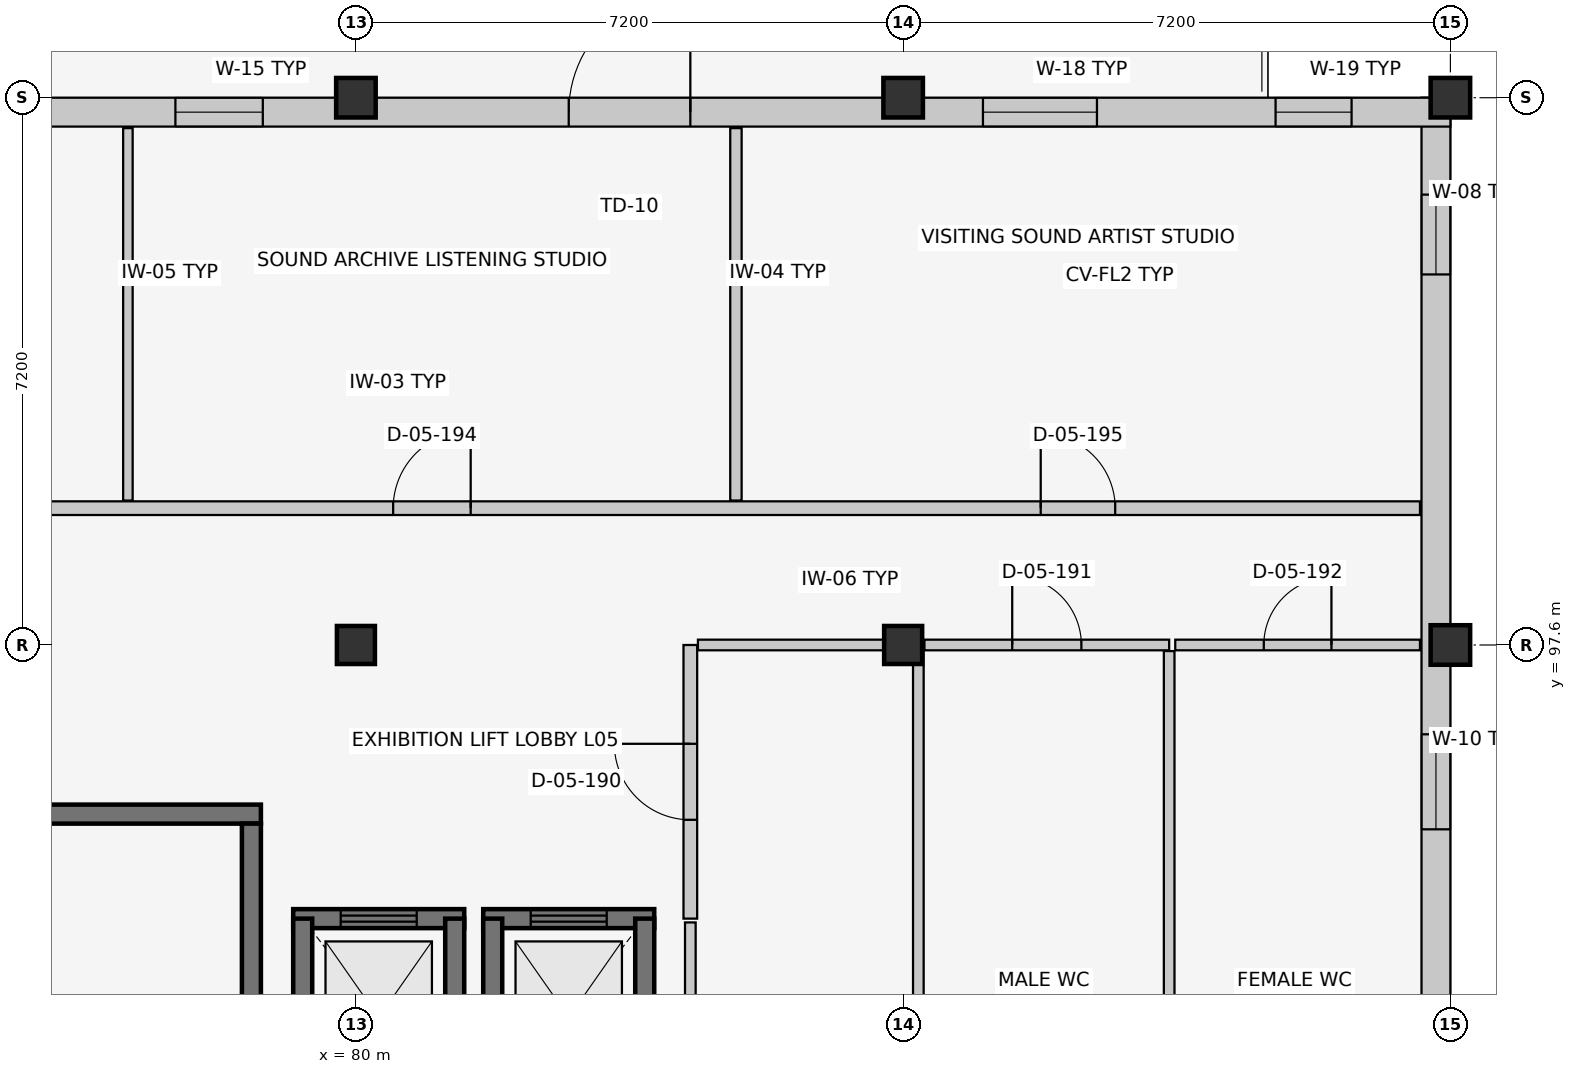
"""IFC4 building model, lengths in metres.
Left out: names, types, materials, properties, quantities, classifications, styles, units other than length and angle.
Written with IfcOpenShell. Run it as: python <this file> out.ifc"""

import sys

from ifc_helpers import new_model, si_unit, direction, frame, frame_2d, origin, origin_2d, place, context, subcontext, project, spatial, rectangle, extrude, element, fill, save


model = new_model("IFC4")
c1 = context("Model", 3, precision=1e-05, world=origin(), true_north=direction((0.0, 1.0)))
c2 = subcontext(c1, "Body", "Model", "MODEL_VIEW")
j1 = project(units=[si_unit("LENGTHUNIT", "METRE"), si_unit("PLANEANGLEUNIT", "RADIAN")], contexts=[c1])
p1 = place(None, origin())
s1 = spatial("IfcSite", under=j1, at=p1, CompositionType="ELEMENT")
p2 = place(p1, origin())
s2 = spatial("IfcBuilding", under=s1, at=p2, CompositionType="ELEMENT")
p3 = place(p2, frame((0.0, 0.0, 21.9)))
s3 = spatial("IfcBuildingStorey", under=s2, at=p3, CompositionType="ELEMENT", Elevation=21.9)
p4 = place(p3, frame((80.0, 97.6, 0.0), z_axis=(0.0, 0.0, 1.0), x_axis=(1.0, 0.0, 0.0)))
e1 = element("IfcColumn", 1, at=p4, inside=s3, PredefinedType="COLUMN", context=c2, shape_type="SweptSolid", body=[
    extrude(rectangle(XDim=0.5, YDim=0.5, at=origin_2d()), origin(), (0.0, 0.0, 1.0), 3.9),
])
p5 = place(p3, frame((80.0, 104.8, 0.0), z_axis=(0.0, 0.0, 1.0), x_axis=(1.0, 0.0, 0.0)))
e2 = element("IfcColumn", 2, at=p5, inside=s3, PredefinedType="COLUMN", context=c2, shape_type="SweptSolid", body=[
    extrude(rectangle(XDim=0.52, YDim=0.52, at=origin_2d()), origin(), (0.0, 0.0, 1.0), 3.9),
])
p6 = place(p3, frame((87.2, 97.6, 0.0), z_axis=(0.0, 0.0, 1.0), x_axis=(1.0, 0.0, 0.0)))
e3 = element("IfcColumn", 3, at=p6, inside=s3, PredefinedType="COLUMN", context=c2, shape_type="SweptSolid", body=[
    extrude(rectangle(XDim=0.5, YDim=0.5, at=origin_2d()), origin(), (0.0, 0.0, 1.0), 3.9),
])
for number, where, z_axis, x_axis in (
    (4, (87.2, 104.8, 0.0), (0.0, 0.0, 1.0), (1.0, 0.0, 0.0)),
    (5, (94.4, 97.6, 0.0), (0.0, 0.0, 1.0), (1.0, 0.0, 0.0)),
    (6, (94.4, 104.8, 0.0), (0.0, 0.0, 1.0), (1.0, 0.0, 0.0)),
):
    element("IfcColumn", number, at=place(p3, frame(where, z_axis=z_axis, x_axis=x_axis)), inside=s3, PredefinedType="COLUMN", context=c2, shape_type="SweptSolid", body=[
        extrude(rectangle(XDim=0.52, YDim=0.52, at=origin_2d()), origin(), (0.0, 0.0, 1.0), 3.9),
    ])
p7 = place(p3, frame((94.21, 104.8, 0.0), z_axis=(0.0, 0.0, 1.0), x_axis=(0.0, -1.0, 0.0)))
e7 = element("IfcWall", 7, at=p7, inside=s3, PredefinedType="SOLIDWALL", context=c2, shape_type="SweptSolid", body=[
    extrude(rectangle(XDim=14.4, YDim=0.38, at=frame_2d((7.2, 0.0))), origin(), (0.0, 0.0, 1.0), 2.915),
])
p8 = place(p7, frame((1.275, 0.0, 0.9)))
e8 = element("IfcOpeningElement", 8, at=p8, cuts=e7, PredefinedType="OPENING", context=c2, shape_type="SweptSolid", body=[
    extrude(rectangle(XDim=1.05, YDim=1.45, at=frame_2d((0.525, 0.725))), frame((0.0, 0.202, 0.0), z_axis=(0.0, -1.0, 0.0), x_axis=(1.0, 0.0, 0.0)), (0.0, 0.0, 1.0), 0.404),
])
p9 = place(p7, frame((8.375, 0.0, 0.9)))
e9 = element("IfcOpeningElement", 9, at=p9, cuts=e7, PredefinedType="OPENING", context=c2, shape_type="SweptSolid", body=[
    extrude(rectangle(XDim=1.25, YDim=1.45, at=frame_2d((0.625, 0.725))), frame((0.0, 0.202, 0.0), z_axis=(0.0, -1.0, 0.0), x_axis=(1.0, 0.0, 0.0)), (0.0, 0.0, 1.0), 0.404),
])
p10 = place(p7, frame((11.925, 0.0, 0.9)))
e10 = element("IfcOpeningElement", 10, at=p10, cuts=e7, PredefinedType="OPENING", context=c2, shape_type="SweptSolid", body=[
    extrude(rectangle(XDim=1.35, YDim=1.45, at=frame_2d((0.675, 0.725))), frame((0.0, 0.202, 0.0), z_axis=(0.0, -1.0, 0.0), x_axis=(1.0, 0.0, 0.0)), (0.0, 0.0, 1.0), 0.404),
])
p11 = place(p3, frame((65.6, 104.61, 0.0), z_axis=(0.0, 0.0, 1.0), x_axis=(1.0, 0.0, 0.0)))
e11 = element("IfcWall", 11, at=p11, inside=s3, PredefinedType="SOLIDWALL", context=c2, shape_type="SweptSolid", body=[
    extrude(rectangle(XDim=28.8, YDim=0.38, at=frame_2d((14.4, 0.0))), origin(), (0.0, 0.0, 1.0), 2.955),
])
p12 = place(p11, frame((17.2, 0.0, 0.0)))
e12 = element("IfcOpeningElement", 12, at=p12, cuts=e11, PredefinedType="OPENING", context=c2, shape_type="SweptSolid", body=[
    extrude(rectangle(XDim=1.6, YDim=2.2, at=frame_2d((0.8, 1.1))), frame((0.0, 0.202, 0.0), z_axis=(0.0, -1.0, 0.0), x_axis=(1.0, 0.0, 0.0)), (0.0, 0.0, 1.0), 0.404),
])
p13 = place(p11, frame((1.075, 0.0, 0.9)))
e13 = element("IfcOpeningElement", 13, at=p13, cuts=e11, PredefinedType="OPENING", context=c2, shape_type="SweptSolid", body=[
    extrude(rectangle(XDim=1.45, YDim=1.45, at=frame_2d((0.725, 0.725))), frame((0.0, 0.202, 0.0), z_axis=(0.0, -1.0, 0.0), x_axis=(1.0, 0.0, 0.0)), (0.0, 0.0, 1.0), 0.404),
])
p14 = place(p11, frame((4.95, 0.0, 0.9)))
e14 = element("IfcOpeningElement", 14, at=p14, cuts=e11, PredefinedType="OPENING", context=c2, shape_type="SweptSolid", body=[
    extrude(rectangle(XDim=0.9, YDim=1.6, at=frame_2d((0.45, 0.8))), frame((0.0, 0.202, 0.0), z_axis=(0.0, -1.0, 0.0), x_axis=(1.0, 0.0, 0.0)), (0.0, 0.0, 1.0), 0.404),
])
p15 = place(p11, frame((8.475, 0.0, 0.9)))
e15 = element("IfcOpeningElement", 15, at=p15, cuts=e11, PredefinedType="OPENING", context=c2, shape_type="SweptSolid", body=[
    extrude(rectangle(XDim=1.05, YDim=1.6, at=frame_2d((0.525, 0.8))), frame((0.0, 0.202, 0.0), z_axis=(0.0, -1.0, 0.0), x_axis=(1.0, 0.0, 0.0)), (0.0, 0.0, 1.0), 0.404),
])
p16 = place(p11, frame((12.025, 0.0, 0.9)))
e16 = element("IfcOpeningElement", 16, at=p16, cuts=e11, PredefinedType="OPENING", context=c2, shape_type="SweptSolid", body=[
    extrude(rectangle(XDim=1.15, YDim=1.6, at=frame_2d((0.575, 0.8))), frame((0.0, 0.202, 0.0), z_axis=(0.0, -1.0, 0.0), x_axis=(1.0, 0.0, 0.0)), (0.0, 0.0, 1.0), 0.404),
])
p17 = place(p11, frame((22.65, 0.0, 0.9)))
e17 = element("IfcOpeningElement", 17, at=p17, cuts=e11, PredefinedType="OPENING", context=c2, shape_type="SweptSolid", body=[
    extrude(rectangle(XDim=1.5, YDim=1.6, at=frame_2d((0.75, 0.8))), frame((0.0, 0.202, 0.0), z_axis=(0.0, -1.0, 0.0), x_axis=(1.0, 0.0, 0.0)), (0.0, 0.0, 1.0), 0.404),
])
p18 = place(p11, frame((26.5, 0.0, 0.9)))
e18 = element("IfcOpeningElement", 18, at=p18, cuts=e11, PredefinedType="OPENING", context=c2, shape_type="SweptSolid", body=[
    extrude(rectangle(XDim=1.0, YDim=1.75, at=frame_2d((0.5, 0.875))), frame((0.0, 0.202, 0.0), z_axis=(0.0, -1.0, 0.0), x_axis=(1.0, 0.0, 0.0)), (0.0, 0.0, 1.0), 0.404),
])
p19 = place(p3, frame((78.75, 95.375, 0.0), z_axis=(0.0, 0.0, 1.0), x_axis=(-1.0, 0.0, 0.0)))
e19 = element("IfcWall", 19, at=p19, inside=s3, PredefinedType="SHEAR", context=c2, shape_type="SweptSolid", body=[
    extrude(rectangle(XDim=9.0, YDim=0.25, at=frame_2d((4.5, 0.0))), origin(), (0.0, 0.0, 1.0), 3.66),
])
p20 = place(p3, frame((78.625, 91.6, 0.0), z_axis=(0.0, 0.0, 1.0), x_axis=(0.0, 1.0, 0.0)))
e20 = element("IfcWall", 20, at=p20, inside=s3, PredefinedType="SHEAR", context=c2, shape_type="SweptSolid", body=[
    extrude(rectangle(XDim=3.65, YDim=0.25, at=frame_2d((1.825, 0.0))), origin(), (0.0, 0.0, 1.0), 3.66),
])
p21 = place(p3, frame((81.425, 94.0, 0.0), z_axis=(0.0, 0.0, 1.0), x_axis=(-1.0, 0.0, 0.0)))
e21 = element("IfcWall", 21, at=p21, inside=s3, PredefinedType="SHEAR", context=c2, shape_type="SweptSolid", body=[
    extrude(rectangle(XDim=2.25, YDim=0.25, at=frame_2d((1.125, 0.0))), origin(), (0.0, 0.0, 1.0), 3.66),
])
p22 = place(p21, frame((0.625, 0.0, 0.0)))
e22 = element("IfcOpeningElement", 22, at=p22, cuts=e21, PredefinedType="OPENING", context=c2, shape_type="SweptSolid", body=[
    extrude(rectangle(XDim=1.0, YDim=2.15, at=frame_2d((0.5, 1.075))), frame((0.0, 0.137, 0.0), z_axis=(0.0, -1.0, 0.0), x_axis=(1.0, 0.0, 0.0)), (0.0, 0.0, 1.0), 0.274),
])
for number, where, z_axis, x_axis in (
    (23, (79.3, 94.0, 0.0), (0.0, 0.0, 1.0), (0.0, -1.0, 0.0)),
    (24, (81.3, 91.4, 0.0), (0.0, 0.0, 1.0), (0.0, 1.0, 0.0)),
):
    element("IfcWall", number, at=place(p3, frame(where, z_axis=z_axis, x_axis=x_axis)), inside=s3, PredefinedType="SHEAR", context=c2, shape_type="SweptSolid", body=[
        extrude(rectangle(XDim=2.6, YDim=0.25, at=frame_2d((1.3, 0.0))), origin(), (0.0, 0.0, 1.0), 3.66),
    ])
p23 = place(p3, frame((83.925, 94.0, 0.0), z_axis=(0.0, 0.0, 1.0), x_axis=(-1.0, 0.0, 0.0)))
e25 = element("IfcWall", 25, at=p23, inside=s3, PredefinedType="SHEAR", context=c2, shape_type="SweptSolid", body=[
    extrude(rectangle(XDim=2.25, YDim=0.25, at=frame_2d((1.125, 0.0))), origin(), (0.0, 0.0, 1.0), 3.66),
])
p24 = place(p23, frame((0.625, 0.0, 0.0)))
e26 = element("IfcOpeningElement", 26, at=p24, cuts=e25, PredefinedType="OPENING", context=c2, shape_type="SweptSolid", body=[
    extrude(rectangle(XDim=1.0, YDim=2.15, at=frame_2d((0.5, 1.075))), frame((0.0, 0.137, 0.0), z_axis=(0.0, -1.0, 0.0), x_axis=(1.0, 0.0, 0.0)), (0.0, 0.0, 1.0), 0.274),
])
for number, where, z_axis, x_axis in (
    (27, (81.8, 94.0, 0.0), (0.0, 0.0, 1.0), (0.0, -1.0, 0.0)),
    (28, (83.8, 91.4, 0.0), (0.0, 0.0, 1.0), (0.0, 1.0, 0.0)),
):
    element("IfcWall", number, at=place(p3, frame(where, z_axis=z_axis, x_axis=x_axis)), inside=s3, PredefinedType="SHEAR", context=c2, shape_type="SweptSolid", body=[
        extrude(rectangle(XDim=2.6, YDim=0.25, at=frame_2d((1.3, 0.0))), origin(), (0.0, 0.0, 1.0), 3.66),
    ])
p25 = place(p3, frame((66.0, 99.4, 0.0), z_axis=(0.0, 0.0, 1.0), x_axis=(1.0, 0.0, 0.0)))
e29 = element("IfcWall", 29, at=p25, inside=s3, PredefinedType="PARTITIONING", context=c2, shape_type="SweptSolid", body=[
    extrude(rectangle(XDim=28.0, YDim=0.18, at=frame_2d((14.0, 0.0))), origin(), (0.0, 0.0, 1.0), 3.66),
])
p26 = place(p25, frame((4.98, 0.0, 0.0)))
e30 = element("IfcOpeningElement", 30, at=p26, cuts=e29, PredefinedType="OPENING", context=c2, shape_type="SweptSolid", body=[
    extrude(rectangle(XDim=1.04, YDim=2.15, at=frame_2d((0.52, 1.075))), frame((0.0, 0.102, 0.0), z_axis=(0.0, -1.0, 0.0), x_axis=(1.0, 0.0, 0.0)), (0.0, 0.0, 1.0), 0.204),
])
p27 = place(p25, frame((14.49, 0.0, 0.0)))
e31 = element("IfcOpeningElement", 31, at=p27, cuts=e29, PredefinedType="OPENING", context=c2, shape_type="SweptSolid", body=[
    extrude(rectangle(XDim=1.02, YDim=2.12, at=frame_2d((0.51, 1.06))), frame((0.0, 0.102, 0.0), z_axis=(0.0, -1.0, 0.0), x_axis=(1.0, 0.0, 0.0)), (0.0, 0.0, 1.0), 0.204),
])
p28 = place(p25, frame((23.01, 0.0, 0.0)))
e32 = element("IfcOpeningElement", 32, at=p28, cuts=e29, PredefinedType="OPENING", context=c2, shape_type="SweptSolid", body=[
    extrude(rectangle(XDim=0.98, YDim=2.12, at=frame_2d((0.49, 1.06))), frame((0.0, 0.102, 0.0), z_axis=(0.0, -1.0, 0.0), x_axis=(1.0, 0.0, 0.0)), (0.0, 0.0, 1.0), 0.204),
])
p29 = place(p3, frame((84.4, 94.0, 0.0), z_axis=(0.0, 0.0, 1.0), x_axis=(0.0, 1.0, 0.0)))
e33 = element("IfcWall", 33, at=p29, inside=s3, PredefinedType="PARTITIONING", context=c2, shape_type="SweptSolid", body=[
    extrude(rectangle(XDim=3.6, YDim=0.18, at=frame_2d((1.8, 0.0))), origin(), (0.0, 0.0, 1.0), 3.66),
])
p30 = place(p29, frame((1.3, 0.0, 0.0)))
e34 = element("IfcOpeningElement", 34, at=p30, cuts=e33, PredefinedType="OPENING", context=c2, shape_type="SweptSolid", body=[
    extrude(rectangle(XDim=1.0, YDim=2.1, at=frame_2d((0.5, 1.05))), frame((0.0, 0.102, 0.0), z_axis=(0.0, -1.0, 0.0), x_axis=(1.0, 0.0, 0.0)), (0.0, 0.0, 1.0), 0.204),
])
p31 = place(p3, frame((84.5, 97.6, 0.0), z_axis=(0.0, 0.0, 1.0), x_axis=(1.0, 0.0, 0.0)))
e35 = element("IfcWall", 35, at=p31, inside=s3, PredefinedType="PARTITIONING", context=c2, shape_type="SweptSolid", body=[
    extrude(rectangle(XDim=2.9, YDim=0.14, at=frame_2d((1.45, 0.0))), origin(), (0.0, 0.0, 1.0), 2.985),
])
p32 = place(p3, frame((87.4, 90.8, 0.0), z_axis=(0.0, 0.0, 1.0), x_axis=(0.0, 1.0, 0.0)))
e36 = element("IfcWall", 36, at=p32, inside=s3, PredefinedType="PARTITIONING", context=c2, shape_type="SweptSolid", body=[
    extrude(rectangle(XDim=6.72, YDim=0.14, at=frame_2d((3.36, 0.0))), origin(), (0.0, 0.0, 1.0), 3.035),
])
p33 = place(p3, frame((87.48, 97.6, 0.0), z_axis=(0.0, 0.0, 1.0), x_axis=(1.0, 0.0, 0.0)))
e37 = element("IfcWall", 37, at=p33, inside=s3, PredefinedType="PARTITIONING", context=c2, shape_type="SweptSolid", body=[
    extrude(rectangle(XDim=3.22, YDim=0.14, at=frame_2d((1.61, 0.0))), origin(), (0.0, 0.0, 1.0), 2.935),
])
p34 = place(p33, frame((1.155, 0.0, 0.0)))
e38 = element("IfcOpeningElement", 38, at=p34, cuts=e37, PredefinedType="OPENING", context=c2, shape_type="SweptSolid", body=[
    extrude(rectangle(XDim=0.91, YDim=2.06, at=frame_2d((0.455, 1.03))), frame((0.0, 0.082, 0.0), z_axis=(0.0, -1.0, 0.0), x_axis=(1.0, 0.0, 0.0)), (0.0, 0.0, 1.0), 0.164),
])
p35 = place(p3, frame((90.7, 90.8, 0.0), z_axis=(0.0, 0.0, 1.0), x_axis=(0.0, 1.0, 0.0)))
e39 = element("IfcWall", 39, at=p35, inside=s3, PredefinedType="PARTITIONING", context=c2, shape_type="SweptSolid", body=[
    extrude(rectangle(XDim=6.72, YDim=0.14, at=frame_2d((3.36, 0.0))), origin(), (0.0, 0.0, 1.0), 3.405),
])
p36 = place(p3, frame((90.78, 97.6, 0.0), z_axis=(0.0, 0.0, 1.0), x_axis=(1.0, 0.0, 0.0)))
e40 = element("IfcWall", 40, at=p36, inside=s3, PredefinedType="PARTITIONING", context=c2, shape_type="SweptSolid", body=[
    extrude(rectangle(XDim=3.22, YDim=0.14, at=frame_2d((1.61, 0.0))), origin(), (0.0, 0.0, 1.0), 2.935),
])
p37 = place(p36, frame((1.165, 0.0, 0.0)))
e41 = element("IfcOpeningElement", 41, at=p37, cuts=e40, PredefinedType="OPENING", context=c2, shape_type="SweptSolid", body=[
    extrude(rectangle(XDim=0.89, YDim=2.05, at=frame_2d((0.445, 1.025))), frame((0.0, 0.082, 0.0), z_axis=(0.0, -1.0, 0.0), x_axis=(1.0, 0.0, 0.0)), (0.0, 0.0, 1.0), 0.164),
])
p38 = place(p3, frame((77.0, 99.5, 0.0), z_axis=(0.0, 0.0, 1.0), x_axis=(0.0, 1.0, 0.0)))
e42 = element("IfcWall", 42, at=p38, inside=s3, PredefinedType="PARTITIONING", context=c2, shape_type="SweptSolid", body=[
    extrude(rectangle(XDim=4.9, YDim=0.125, at=frame_2d((2.45, 0.0))), origin(), (0.0, 0.0, 1.0), 3.66),
])
p39 = place(p3, frame((85.0, 99.5, 0.0), z_axis=(0.0, 0.0, 1.0), x_axis=(0.0, 1.0, 0.0)))
e43 = element("IfcWall", 43, at=p39, inside=s3, PredefinedType="PARTITIONING", context=c2, shape_type="SweptSolid", body=[
    extrude(rectangle(XDim=4.9, YDim=0.15, at=frame_2d((2.45, 0.0))), origin(), (0.0, 0.0, 1.0), 3.66),
])
p40 = place(p3, frame((84.4, 90.95, 0.0), z_axis=(0.0, 0.0, 1.0), x_axis=(0.0, 1.0, 0.0)))
e44 = element("IfcWall", 44, at=p40, inside=s3, PredefinedType="PARTITIONING", context=c2, shape_type="SweptSolid", body=[
    extrude(rectangle(XDim=3.0, YDim=0.14, at=frame_2d((1.5, 0.0))), origin(), (0.0, 0.0, 1.0), 3.66),
])
p41 = place(p8, origin())
e45 = element("IfcWindow", 45, at=p41, inside=s3, PartitioningType="SINGLE_PANEL", PredefinedType="WINDOW", context=c2, shape_type="SweptSolid", body=[
    extrude(rectangle(XDim=1.05, YDim=1.45, at=frame_2d((0.525, 0.725))), frame((0.0, 0.03, 0.0), z_axis=(0.0, -1.0, 0.0), x_axis=(1.0, 0.0, 0.0)), (0.0, 0.0, 1.0), 0.06),
])
fill(e8, e45)
p42 = place(p9, origin())
e46 = element("IfcWindow", 46, at=p42, inside=s3, PartitioningType="SINGLE_PANEL", PredefinedType="WINDOW", context=c2, shape_type="SweptSolid", body=[
    extrude(rectangle(XDim=1.25, YDim=1.45, at=frame_2d((0.625, 0.725))), frame((0.0, 0.03, 0.0), z_axis=(0.0, -1.0, 0.0), x_axis=(1.0, 0.0, 0.0)), (0.0, 0.0, 1.0), 0.06),
])
fill(e9, e46)
p43 = place(p12, origin())
e47 = element("IfcDoor", 47, at=p43, inside=s3, OperationType="SINGLE_SWING_RIGHT", PredefinedType="DOOR", context=c2, shape_type="SweptSolid", body=[
    extrude(rectangle(XDim=1.6, YDim=2.2, at=frame_2d((0.8, 1.1))), frame((0.0, 0.025, 0.0), z_axis=(0.0, -1.0, 0.0), x_axis=(1.0, 0.0, 0.0)), (0.0, 0.0, 1.0), 0.05),
])
fill(e12, e47)
p44 = place(p16, origin())
e48 = element("IfcWindow", 48, at=p44, inside=s3, PartitioningType="SINGLE_PANEL", PredefinedType="WINDOW", context=c2, shape_type="SweptSolid", body=[
    extrude(rectangle(XDim=1.15, YDim=1.6, at=frame_2d((0.575, 0.8))), frame((0.0, 0.03, 0.0), z_axis=(0.0, -1.0, 0.0), x_axis=(1.0, 0.0, 0.0)), (0.0, 0.0, 1.0), 0.06),
])
fill(e16, e48)
p45 = place(p17, origin())
e49 = element("IfcWindow", 49, at=p45, inside=s3, PartitioningType="SINGLE_PANEL", PredefinedType="WINDOW", context=c2, shape_type="SweptSolid", body=[
    extrude(rectangle(XDim=1.5, YDim=1.6, at=frame_2d((0.75, 0.8))), frame((0.0, 0.03, 0.0), z_axis=(0.0, -1.0, 0.0), x_axis=(1.0, 0.0, 0.0)), (0.0, 0.0, 1.0), 0.06),
])
fill(e17, e49)
p46 = place(p18, origin())
e50 = element("IfcWindow", 50, at=p46, inside=s3, PartitioningType="SINGLE_PANEL", PredefinedType="WINDOW", context=c2, shape_type="SweptSolid", body=[
    extrude(rectangle(XDim=1.0, YDim=1.75, at=frame_2d((0.5, 0.875))), frame((0.0, 0.03, 0.0), z_axis=(0.0, -1.0, 0.0), x_axis=(1.0, 0.0, 0.0)), (0.0, 0.0, 1.0), 0.06),
])
fill(e18, e50)
p47 = place(p22, origin())
e51 = element("IfcDoor", 51, at=p47, inside=s3, OperationType="SLIDING_TO_LEFT", PredefinedType="DOOR", context=c2, shape_type="SweptSolid", body=[
    extrude(rectangle(XDim=1.0, YDim=2.15, at=frame_2d((0.5, 1.075))), frame((0.0, 0.025, 0.0), z_axis=(0.0, -1.0, 0.0), x_axis=(1.0, 0.0, 0.0)), (0.0, 0.0, 1.0), 0.05),
])
fill(e22, e51)
p48 = place(p24, origin())
e52 = element("IfcDoor", 52, at=p48, inside=s3, OperationType="SLIDING_TO_LEFT", PredefinedType="DOOR", context=c2, shape_type="SweptSolid", body=[
    extrude(rectangle(XDim=1.0, YDim=2.15, at=frame_2d((0.5, 1.075))), frame((0.0, 0.025, 0.0), z_axis=(0.0, -1.0, 0.0), x_axis=(1.0, 0.0, 0.0)), (0.0, 0.0, 1.0), 0.05),
])
fill(e26, e52)
p49 = place(p30, origin())
e53 = element("IfcDoor", 53, at=p49, inside=s3, OperationType="SINGLE_SWING_RIGHT", PredefinedType="DOOR", context=c2, shape_type="SweptSolid", body=[
    extrude(rectangle(XDim=1.0, YDim=2.1, at=frame_2d((0.5, 1.05))), frame((0.0, 0.025, 0.0), z_axis=(0.0, -1.0, 0.0), x_axis=(1.0, 0.0, 0.0)), (0.0, 0.0, 1.0), 0.05),
])
fill(e34, e53)
p50 = place(p34, origin())
e54 = element("IfcDoor", 54, at=p50, inside=s3, OperationType="SINGLE_SWING_LEFT", PredefinedType="DOOR", context=c2, shape_type="SweptSolid", body=[
    extrude(rectangle(XDim=0.91, YDim=2.06, at=frame_2d((0.455, 1.03))), frame((0.0, 0.025, 0.0), z_axis=(0.0, -1.0, 0.0), x_axis=(1.0, 0.0, 0.0)), (0.0, 0.0, 1.0), 0.05),
])
fill(e38, e54)
p51 = place(p37, origin())
e55 = element("IfcDoor", 55, at=p51, inside=s3, OperationType="SINGLE_SWING_RIGHT", PredefinedType="DOOR", context=c2, shape_type="SweptSolid", body=[
    extrude(rectangle(XDim=0.89, YDim=2.05, at=frame_2d((0.445, 1.025))), frame((0.0, 0.025, 0.0), z_axis=(0.0, -1.0, 0.0), x_axis=(1.0, 0.0, 0.0)), (0.0, 0.0, 1.0), 0.05),
])
fill(e41, e55)
p52 = place(p27, origin())
e56 = element("IfcDoor", 56, at=p52, inside=s3, OperationType="SINGLE_SWING_RIGHT", PredefinedType="DOOR", context=c2, shape_type="SweptSolid", body=[
    extrude(rectangle(XDim=1.02, YDim=2.12, at=frame_2d((0.51, 1.06))), frame((0.0, 0.025, 0.0), z_axis=(0.0, -1.0, 0.0), x_axis=(1.0, 0.0, 0.0)), (0.0, 0.0, 1.0), 0.05),
])
fill(e31, e56)
p53 = place(p28, origin())
e57 = element("IfcDoor", 57, at=p53, inside=s3, OperationType="SINGLE_SWING_LEFT", PredefinedType="DOOR", context=c2, shape_type="SweptSolid", body=[
    extrude(rectangle(XDim=0.98, YDim=2.12, at=frame_2d((0.49, 1.06))), frame((0.0, 0.025, 0.0), z_axis=(0.0, -1.0, 0.0), x_axis=(1.0, 0.0, 0.0)), (0.0, 0.0, 1.0), 0.05),
])
fill(e32, e57)
save(model, sys.argv[1])
